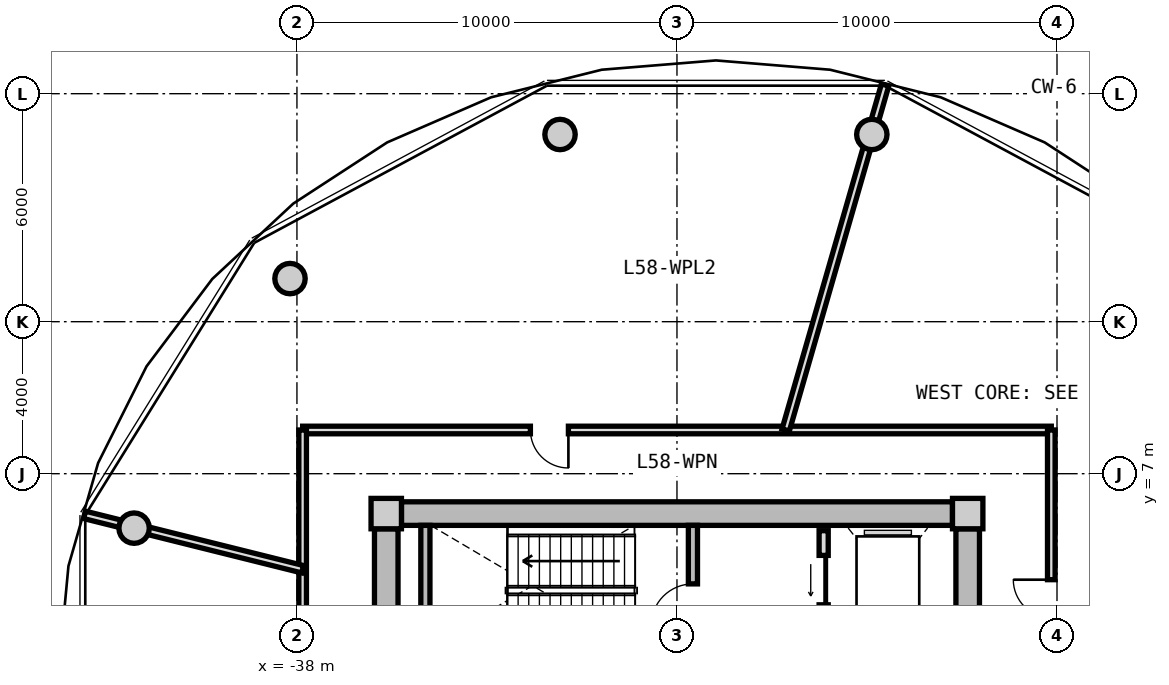
"""IFC4 building model, lengths in metres.
Left out: names, types, materials, properties, quantities, classifications, styles, units other than length and angle.
Written with IfcOpenShell. Run it as: python <this file> out.ifc"""

import sys

from ifc_helpers import new_model, si_unit, direction, frame, frame_2d, origin, origin_2d, place, context, subcontext, project, spatial, rectangle, circle, extrude, source, transform, mapped, element, fill, save


model = new_model("IFC4")
c1 = context("Model", 3, precision=1e-05, world=origin(), true_north=direction((0.0, 1.0)))
c2 = subcontext(c1, "Body", "Model", "MODEL_VIEW")
j1 = project(units=[si_unit("LENGTHUNIT", "METRE"), si_unit("PLANEANGLEUNIT", "RADIAN")], contexts=[c1])
p1 = place(None, origin())
s1 = spatial("IfcSite", under=j1, at=p1, CompositionType="ELEMENT")
p2 = place(p1, origin())
s2 = spatial("IfcBuilding", under=s1, at=p2, CompositionType="ELEMENT")
p3 = place(p2, frame((0.0, 0.0, 186.15)))
s3 = spatial("IfcBuildingStorey", under=s2, at=p3, CompositionType="ELEMENT", Elevation=186.15)
m1 = source(origin(), c2, "Body", "SweptSolid", [
    extrude(rectangle(XDim=0.8, YDim=0.8, at=origin_2d()), origin(), (0.0, 0.0, 1.0), 4.5),
])
for number, where, z_axis, x_axis in (
    (1, (-20.35, 5.95, 0.0), (0.0, 0.0, 1.0), (1.0, 0.0, 0.0)),
    (2, (-35.65, 5.95, 0.0), (0.0, 0.0, 1.0), (1.0, 0.0, 0.0)),
):
    element("IfcColumn", number, at=place(p3, frame(where, z_axis=z_axis, x_axis=x_axis)), inside=s3, PredefinedType="COLUMN", context=c2, shape_type="MappedRepresentation", body=[
        mapped(m1, transform((0.0, 0.0, 0.0), x_axis=(1.0, 0.0, 0.0), y_axis=(0.0, 1.0, 0.0), z_axis=(0.0, 0.0, 1.0), scale=1.0)),
    ])
m2 = source(origin(), c2, "Body", "SweptSolid", [
    extrude(rectangle(XDim=14.5, YDim=0.62, at=frame_2d((7.25, 0.0))), origin(), (0.0, 0.0, 1.0), 4.08),
])
p4 = place(p3, frame((-35.25, 5.95, 0.0), z_axis=(0.0, 0.0, 1.0), x_axis=(1.0, 0.0, 0.0)))
e3 = element("IfcWall", 3, at=p4, inside=s3, PredefinedType="SHEAR", context=c2, shape_type="MappedRepresentation", body=[
    mapped(m2, transform((0.0, 0.0, 0.0), x_axis=(1.0, 0.0, 0.0), y_axis=(0.0, 1.0, 0.0), z_axis=(0.0, 0.0, 1.0), scale=1.0)),
])
m3 = source(origin(), c2, "Body", "SweptSolid", [
    extrude(rectangle(XDim=11.1, YDim=0.62, at=frame_2d((5.55, 0.0))), origin(), (0.0, 0.0, 1.0), 4.08),
])
p5 = place(p3, frame((-35.65, -5.55, 0.0), z_axis=(0.0, 0.0, 1.0), x_axis=(0.0, 1.0, 0.0)))
e4 = element("IfcWall", 4, at=p5, inside=s3, PredefinedType="SHEAR", context=c2, shape_type="MappedRepresentation", body=[
    mapped(m3, transform((0.0, 0.0, 0.0), x_axis=(1.0, 0.0, 0.0), y_axis=(0.0, 1.0, 0.0), z_axis=(0.0, 0.0, 1.0), scale=1.0)),
])
p6 = place(p5, frame((3.8, 0.0, 0.0)))
e5 = element("IfcOpeningElement", 5, at=p6, cuts=e4, PredefinedType="OPENING", context=c2, shape_type="SweptSolid", body=[
    extrude(rectangle(XDim=1.2, YDim=2.15, at=frame_2d((0.6, 1.075))), frame((0.0, 0.32, 0.0), z_axis=(0.0, -1.0, 0.0), x_axis=(1.0, 0.0, 0.0)), (0.0, 0.0, 1.0), 0.64),
])
p7 = place(p3, frame((-20.35, 5.55, 0.0), z_axis=(0.0, 0.0, 1.0), x_axis=(0.0, -1.0, 0.0)))
e6 = element("IfcWall", 6, at=p7, inside=s3, PredefinedType="SHEAR", context=c2, shape_type="MappedRepresentation", body=[
    mapped(m3, transform((0.0, 0.0, 0.0), x_axis=(1.0, 0.0, 0.0), y_axis=(0.0, 1.0, 0.0), z_axis=(0.0, 0.0, 1.0), scale=1.0)),
])
p8 = place(p7, frame((5.65, 0.0, 0.0)))
e7 = element("IfcOpeningElement", 7, at=p8, cuts=e6, PredefinedType="OPENING", context=c2, shape_type="SweptSolid", body=[
    extrude(rectangle(XDim=1.2, YDim=2.15, at=frame_2d((0.6, 1.075))), frame((0.0, 0.32, 0.0), z_axis=(0.0, -1.0, 0.0), x_axis=(1.0, 0.0, 0.0)), (0.0, 0.0, 1.0), 0.64),
])
p9 = place(p7, frame((9.3, 0.0, 0.0)))
e8 = element("IfcOpeningElement", 8, at=p9, cuts=e6, PredefinedType="OPENING", context=c2, shape_type="SweptSolid", body=[
    extrude(rectangle(XDim=1.0, YDim=2.1, at=frame_2d((0.5, 1.05))), frame((0.0, 0.32, 0.0), z_axis=(0.0, -1.0, 0.0), x_axis=(1.0, 0.0, 0.0)), (0.0, 0.0, 1.0), 0.64),
])
m4 = source(origin(), c2, "Body", "SweptSolid", [
    extrude(circle(Radius=0.4, at=origin_2d()), origin(), (0.0, 0.0, 1.0), 4.08),
])
for number, where, z_axis, x_axis in (
    (9, (-22.873, 15.926, 0.0), (0.0, 0.0, 1.0), (1.0, 0.0, 0.0)),
    (10, (-31.077, 15.926, 0.0), (0.0, 0.0, 1.0), (1.0, 0.0, 0.0)),
    (11, (-38.183, 12.135, 0.0), (0.0, 0.0, 1.0), (1.0, 0.0, 0.0)),
    (12, (-42.285, 5.567, 0.0), (0.0, 0.0, 1.0), (1.0, 0.0, 0.0)),
):
    element("IfcColumn", number, at=place(p3, frame(where, z_axis=z_axis, x_axis=x_axis)), inside=s3, PredefinedType="COLUMN", context=c2, shape_type="MappedRepresentation", body=[
        mapped(m4, transform((0.0, 0.0, 0.0), x_axis=(1.0, 0.0, 0.0), y_axis=(0.0, 1.0, 0.0), z_axis=(0.0, 0.0, 1.0), scale=1.0)),
    ])
m5 = source(origin(), c2, "Body", "SweptSolid", [
    extrude(rectangle(XDim=3.19, YDim=0.24, at=frame_2d((1.595, 0.0))), origin(), (0.0, 0.0, 1.0), 4.08),
])
p10 = place(p3, frame((-34.62, 2.45, 0.0), z_axis=(0.0, 0.0, 1.0), x_axis=(0.0, 1.0, 0.0)))
e13 = element("IfcWall", 13, at=p10, inside=s3, PredefinedType="PARTITIONING", context=c2, shape_type="MappedRepresentation", body=[
    mapped(m5, transform((0.0, 0.0, 0.0), x_axis=(1.0, 0.0, 0.0), y_axis=(0.0, 1.0, 0.0), z_axis=(0.0, 0.0, 1.0), scale=1.0)),
])
p11 = place(p3, frame((-27.58, 2.45, 0.0), z_axis=(0.0, 0.0, 1.0), x_axis=(0.0, 1.0, 0.0)))
e14 = element("IfcWall", 14, at=p11, inside=s3, PredefinedType="PARTITIONING", context=c2, shape_type="MappedRepresentation", body=[
    mapped(m5, transform((0.0, 0.0, 0.0), x_axis=(1.0, 0.0, 0.0), y_axis=(0.0, 1.0, 0.0), z_axis=(0.0, 0.0, 1.0), scale=1.0)),
])
p12 = place(p11, frame((0.55, 0.0, 0.0)))
e15 = element("IfcOpeningElement", 15, at=p12, cuts=e14, PredefinedType="OPENING", context=c2, shape_type="SweptSolid", body=[
    extrude(rectangle(XDim=1.1, YDim=2.15, at=frame_2d((0.55, 1.075))), frame((0.0, 0.13, 0.0), z_axis=(0.0, -1.0, 0.0), x_axis=(1.0, 0.0, 0.0)), (0.0, 0.0, 1.0), 0.26),
])
m6 = source(origin(), c2, "Body", "SweptSolid", [
    extrude(rectangle(XDim=5.0, YDim=0.24, at=frame_2d((2.5, 0.0))), origin(), (0.0, 0.0, 1.0), 4.065),
])
p13 = place(p3, frame((-24.14, 0.5, 0.0), z_axis=(0.0, 0.0, 1.0), x_axis=(0.0, 1.0, 0.0)))
e16 = element("IfcWall", 16, at=p13, inside=s3, PredefinedType="PARTITIONING", context=c2, shape_type="MappedRepresentation", body=[
    mapped(m6, transform((0.0, 0.0, 0.0), x_axis=(1.0, 0.0, 0.0), y_axis=(0.0, 1.0, 0.0), z_axis=(0.0, 0.0, 1.0), scale=1.0)),
])
p14 = place(p13, frame((3.05, 0.0, 0.0)))
e17 = element("IfcOpeningElement", 17, at=p14, cuts=e16, PredefinedType="OPENING", context=c2, shape_type="SweptSolid", body=[
    extrude(rectangle(XDim=1.3, YDim=2.2, at=frame_2d((0.65, 1.1))), frame((0.0, 0.13, 0.0), z_axis=(0.0, -1.0, 0.0), x_axis=(1.0, 0.0, 0.0)), (0.0, 0.0, 1.0), 0.26),
])
p15 = place(p13, frame((0.55, 0.0, 0.0)))
e18 = element("IfcOpeningElement", 18, at=p15, cuts=e16, PredefinedType="OPENING", context=c2, shape_type="SweptSolid", body=[
    extrude(rectangle(XDim=1.3, YDim=2.2, at=frame_2d((0.65, 1.1))), frame((0.0, 0.13, 0.0), z_axis=(0.0, -1.0, 0.0), x_axis=(1.0, 0.0, 0.0)), (0.0, 0.0, 1.0), 0.26),
])
m7 = source(origin(), c2, "Body", "SweptSolid", [
    extrude(rectangle(XDim=19.7, YDim=0.2, at=frame_2d((9.85, 0.0))), origin(), (0.0, 0.0, 1.0), 4.065),
])
p16 = place(p3, frame((-37.85, 8.15, 0.0), z_axis=(0.0, 0.0, 1.0), x_axis=(1.0, 0.0, 0.0)))
e19 = element("IfcWall", 19, at=p16, inside=s3, PredefinedType="PARTITIONING", context=c2, shape_type="MappedRepresentation", body=[
    mapped(m7, transform((0.0, 0.0, 0.0), x_axis=(1.0, 0.0, 0.0), y_axis=(0.0, 1.0, 0.0), z_axis=(0.0, 0.0, 1.0), scale=1.0)),
])
p17 = place(p16, frame((5.993, 0.0, 0.0)))
e20 = element("IfcOpeningElement", 20, at=p17, cuts=e19, PredefinedType="OPENING", context=c2, shape_type="SweptSolid", body=[
    extrude(rectangle(XDim=1.0, YDim=2.1, at=frame_2d((0.5, 1.05))), frame((0.0, 0.11, 0.0), z_axis=(0.0, -1.0, 0.0), x_axis=(1.0, 0.0, 0.0)), (0.0, 0.0, 1.0), 0.22),
])
m8 = source(origin(), c2, "Body", "SweptSolid", [
    extrude(rectangle(XDim=16.3, YDim=0.2, at=frame_2d((8.15, 0.0))), origin(), (0.0, 0.0, 1.0), 4.065),
])
p18 = place(p3, frame((-37.85, -8.15, 0.0), z_axis=(0.0, 0.0, 1.0), x_axis=(0.0, 1.0, 0.0)))
e21 = element("IfcWall", 21, at=p18, inside=s3, PredefinedType="PARTITIONING", context=c2, shape_type="MappedRepresentation", body=[
    mapped(m8, transform((0.0, 0.0, 0.0), x_axis=(1.0, 0.0, 0.0), y_axis=(0.0, 1.0, 0.0), z_axis=(0.0, 0.0, 1.0), scale=1.0)),
])
p19 = place(p18, frame((5.972, 0.0, 0.0)))
e22 = element("IfcOpeningElement", 22, at=p19, cuts=e21, PredefinedType="OPENING", context=c2, shape_type="SweptSolid", body=[
    extrude(rectangle(XDim=1.0, YDim=2.1, at=frame_2d((0.5, 1.05))), frame((0.0, 0.11, 0.0), z_axis=(0.0, -1.0, 0.0), x_axis=(1.0, 0.0, 0.0)), (0.0, 0.0, 1.0), 0.22),
])
p20 = place(p3, frame((-18.15, 8.15, 0.0), z_axis=(0.0, 0.0, 1.0), x_axis=(0.0, -1.0, 0.0)))
e23 = element("IfcWall", 23, at=p20, inside=s3, PredefinedType="PARTITIONING", context=c2, shape_type="MappedRepresentation", body=[
    mapped(m8, transform((0.0, 0.0, 0.0), x_axis=(1.0, 0.0, 0.0), y_axis=(0.0, 1.0, 0.0), z_axis=(0.0, 0.0, 1.0), scale=1.0)),
])
p21 = place(p20, frame((3.939, 0.0, 0.0)))
e24 = element("IfcOpeningElement", 24, at=p21, cuts=e23, PredefinedType="OPENING", context=c2, shape_type="SweptSolid", body=[
    extrude(rectangle(XDim=1.0, YDim=2.1, at=frame_2d((0.5, 1.05))), frame((0.0, 0.11, 0.0), z_axis=(0.0, -1.0, 0.0), x_axis=(1.0, 0.0, 0.0)), (0.0, 0.0, 1.0), 0.22),
])
m9 = source(origin(), c2, "Body", "SweptSolid", [
    extrude(rectangle(XDim=9.449, YDim=0.2, at=frame_2d((4.725, 0.0))), origin(), (0.0, 0.0, 1.0), 2.515),
])
p22 = place(p3, frame((-25.139, 8.15, 0.0), z_axis=(0.0, 0.0, 1.0), x_axis=(0.276808823174, 0.960925010296, 0.0)))
e25 = element("IfcWall", 25, at=p22, inside=s3, PredefinedType="PARTITIONING", context=c2, shape_type="MappedRepresentation", body=[
    mapped(m9, transform((0.0, 0.0, 0.0), x_axis=(1.0, 0.0, 0.0), y_axis=(0.0, 1.0, 0.0), z_axis=(0.0, 0.0, 1.0), scale=1.0)),
])
m10 = source(origin(), c2, "Body", "SweptSolid", [
    extrude(rectangle(XDim=5.914, YDim=0.2, at=frame_2d((2.957, 0.0))), origin(), (0.0, 0.0, 1.0), 4.065),
])
p23 = place(p3, frame((-37.85, 4.486, 0.0), z_axis=(0.0, 0.0, 1.0), x_axis=(-0.970312235668, 0.241855670415, 0.0)))
e26 = element("IfcWall", 26, at=p23, inside=s3, PredefinedType="PARTITIONING", context=c2, shape_type="MappedRepresentation", body=[
    mapped(m10, transform((0.0, 0.0, 0.0), x_axis=(1.0, 0.0, 0.0), y_axis=(0.0, 1.0, 0.0), z_axis=(0.0, 0.0, 1.0), scale=1.0)),
])
m11 = source(origin(), c2, "Body", "SweptSolid", [
    extrude(rectangle(XDim=1.1, YDim=2.15, at=frame_2d((0.55, 1.075))), frame((0.0, 0.025, 0.0), z_axis=(0.0, -1.0, 0.0), x_axis=(1.0, 0.0, 0.0)), (0.0, 0.0, 1.0), 0.05),
])
p24 = place(p12, origin())
e27 = element("IfcDoor", 27, at=p24, inside=s3, OperationType="SINGLE_SWING_LEFT", PredefinedType="DOOR", context=c2, shape_type="MappedRepresentation", body=[
    mapped(m11, transform((0.0, 0.0, 0.0), x_axis=(1.0, 0.0, 0.0), y_axis=(0.0, 1.0, 0.0), z_axis=(0.0, 0.0, 1.0), scale=1.0)),
])
fill(e15, e27)
m12 = source(origin(), c2, "Body", "SweptSolid", [
    extrude(rectangle(XDim=1.3, YDim=2.2, at=frame_2d((0.65, 1.1))), frame((0.0, 0.025, 0.0), z_axis=(0.0, -1.0, 0.0), x_axis=(1.0, 0.0, 0.0)), (0.0, 0.0, 1.0), 0.05),
])
p25 = place(p14, origin())
e28 = element("IfcDoor", 28, at=p25, inside=s3, OperationType="SLIDING_TO_LEFT", PredefinedType="DOOR", context=c2, shape_type="MappedRepresentation", body=[
    mapped(m12, transform((0.0, 0.0, 0.0), x_axis=(1.0, 0.0, 0.0), y_axis=(0.0, 1.0, 0.0), z_axis=(0.0, 0.0, 1.0), scale=1.0)),
])
fill(e17, e28)
m13 = source(origin(), c2, "Body", "SweptSolid", [
    extrude(rectangle(XDim=1.0, YDim=2.1, at=frame_2d((0.5, 1.05))), frame((0.0, 0.025, 0.0), z_axis=(0.0, -1.0, 0.0), x_axis=(1.0, 0.0, 0.0)), (0.0, 0.0, 1.0), 0.05),
])
p26 = place(p21, frame((1.0, 0.0, 0.0), z_axis=(0.0, 0.0, 1.0), x_axis=(-1.0, 0.0, 0.0)))
e29 = element("IfcDoor", 29, at=p26, inside=s3, OperationType="SINGLE_SWING_RIGHT", PredefinedType="DOOR", context=c2, shape_type="MappedRepresentation", body=[
    mapped(m13, transform((0.0, 0.0, 0.0), x_axis=(1.0, 0.0, 0.0), y_axis=(0.0, 1.0, 0.0), z_axis=(0.0, 0.0, 1.0), scale=1.0)),
])
fill(e24, e29)
p27 = place(p17, frame((1.0, 0.0, 0.0), z_axis=(0.0, 0.0, 1.0), x_axis=(-1.0, 0.0, 0.0)))
e30 = element("IfcDoor", 30, at=p27, inside=s3, OperationType="SINGLE_SWING_LEFT", PredefinedType="DOOR", context=c2, shape_type="MappedRepresentation", body=[
    mapped(m13, transform((0.0, 0.0, 0.0), x_axis=(1.0, 0.0, 0.0), y_axis=(0.0, 1.0, 0.0), z_axis=(0.0, 0.0, 1.0), scale=1.0)),
])
fill(e20, e30)
save(model, sys.argv[1])
